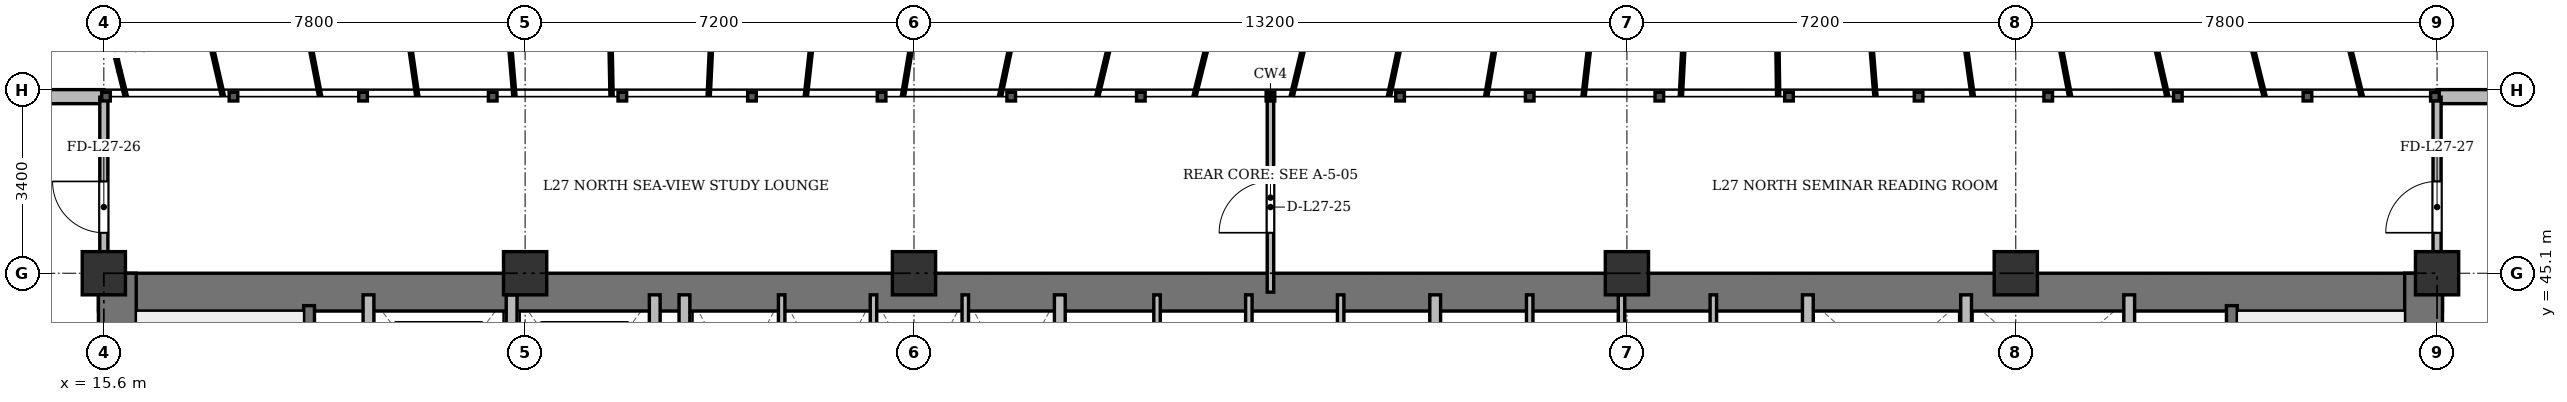
"""IFC4 building model, lengths in metres.
Left out: names, types, materials, properties, quantities, classifications, styles, units other than length and angle.
Written with IfcOpenShell. Run it as: python <this file> out.ifc"""

import sys

from ifc_helpers import new_model, si_unit, direction, frame, frame_2d, origin, origin_2d, place, context, subcontext, project, spatial, rectangle, extrude, source, transform, mapped, element, fill, save


model = new_model("IFC4")
c1 = context("Model", 3, precision=1e-05, world=origin(), true_north=direction((0.0, 1.0)))
c2 = subcontext(c1, "Body", "Model", "MODEL_VIEW")
j1 = project(units=[si_unit("LENGTHUNIT", "METRE"), si_unit("PLANEANGLEUNIT", "RADIAN")], contexts=[c1])
p1 = place(None, origin())
s1 = spatial("IfcSite", under=j1, at=p1, CompositionType="ELEMENT")
p2 = place(p1, origin())
s2 = spatial("IfcBuilding", under=s1, at=p2, CompositionType="ELEMENT")
p3 = place(p2, frame((0.0, 0.0, 106.9)))
s3 = spatial("IfcBuildingStorey", under=s2, at=p3, CompositionType="ELEMENT", Elevation=106.9)
m1 = source(origin(), c2, "Body", "SweptSolid", [
    extrude(rectangle(XDim=0.8, YDim=0.8, at=origin_2d()), origin(), (0.0, 0.0, 1.0), 3.6),
])
for number, where, z_axis, x_axis in (
    (1, (15.6, 45.1, 0.0), (0.0, 0.0, 1.0), (1.0, 0.0, 0.0)),
    (2, (23.4, 45.1, 0.0), (0.0, 0.0, 1.0), (1.0, 0.0, 0.0)),
    (3, (30.6, 45.1, 0.0), (0.0, 0.0, 1.0), (1.0, 0.0, 0.0)),
    (4, (43.8, 45.1, 0.0), (0.0, 0.0, 1.0), (1.0, 0.0, 0.0)),
    (5, (51.0, 45.1, 0.0), (0.0, 0.0, 1.0), (1.0, 0.0, 0.0)),
    (6, (58.8, 45.1, 0.0), (0.0, 0.0, 1.0), (1.0, 0.0, 0.0)),
):
    element("IfcColumn", number, at=place(p3, frame(where, z_axis=z_axis, x_axis=x_axis)), inside=s3, PredefinedType="COLUMN", context=c2, shape_type="MappedRepresentation", body=[
        mapped(m1, transform((0.0, 0.0, 0.0), x_axis=(1.0, 0.0, 0.0), y_axis=(0.0, 1.0, 0.0), z_axis=(0.0, 0.0, 1.0), scale=1.0)),
    ])
p4 = place(p3, frame((7.6, 48.37, 0.0), z_axis=(0.0, 0.0, 1.0), x_axis=(1.0, 0.0, 0.0)))
e7 = element("IfcWall", 7, at=p4, inside=s3, PredefinedType="SOLIDWALL", context=c2, shape_type="SweptSolid", body=[
    extrude(rectangle(XDim=8.0, YDim=0.26, at=frame_2d((4.0, 0.0))), origin(), (0.0, 0.0, 1.0), 3.34),
])
p5 = place(p4, frame((3.325, 0.0, 0.9)))
e8 = element("IfcOpeningElement", 8, at=p5, cuts=e7, PredefinedType="OPENING", context=c2, shape_type="SweptSolid", body=[
    extrude(rectangle(XDim=1.35, YDim=1.5, at=frame_2d((0.675, 0.75))), frame((0.0, 0.14, 0.0), z_axis=(0.0, -1.0, 0.0), x_axis=(1.0, 0.0, 0.0)), (0.0, 0.0, 1.0), 0.28),
])
p6 = place(p3, frame((58.8, 48.37, 0.0), z_axis=(0.0, 0.0, 1.0), x_axis=(1.0, 0.0, 0.0)))
e9 = element("IfcWall", 9, at=p6, inside=s3, PredefinedType="SOLIDWALL", context=c2, shape_type="SweptSolid", body=[
    extrude(rectangle(XDim=8.0, YDim=0.26, at=frame_2d((4.0, 0.0))), origin(), (0.0, 0.0, 1.0), 3.34),
])
p7 = place(p6, frame((3.325, 0.0, 0.9)))
e10 = element("IfcOpeningElement", 10, at=p7, cuts=e9, PredefinedType="OPENING", context=c2, shape_type="SweptSolid", body=[
    extrude(rectangle(XDim=1.35, YDim=1.5, at=frame_2d((0.675, 0.75))), frame((0.0, 0.14, 0.0), z_axis=(0.0, -1.0, 0.0), x_axis=(1.0, 0.0, 0.0)), (0.0, 0.0, 1.0), 0.28),
])
p8 = place(p3, frame((15.5, 44.75, 0.0), z_axis=(0.0, 0.0, 1.0), x_axis=(1.0, 0.0, 0.0)))
e11 = element("IfcWall", 11, at=p8, inside=s3, PredefinedType="SHEAR", context=c2, shape_type="SweptSolid", body=[
    extrude(rectangle(XDim=43.4, YDim=0.7, at=frame_2d((21.7, 0.0))), origin(), (0.0, 0.0, 1.0), 3.34),
])
for number, where, z_axis, x_axis in (
    (12, (15.85, 33.4, 0.0), (0.0, 0.0, 1.0), (0.0, 1.0, 0.0)),
    (13, (58.55, 33.4, 0.0), (0.0, 0.0, 1.0), (0.0, 1.0, 0.0)),
):
    element("IfcWall", number, at=place(p3, frame(where, z_axis=z_axis, x_axis=x_axis)), inside=s3, PredefinedType="SHEAR", context=c2, shape_type="SweptSolid", body=[
        extrude(rectangle(XDim=11.7, YDim=0.7, at=frame_2d((5.85, 0.0))), origin(), (0.0, 0.0, 1.0), 3.34),
    ])
p9 = place(p3, frame((19.4, 33.4, 0.0), z_axis=(0.0, 0.0, 1.0), x_axis=(0.0, 1.0, 0.0)))
e14 = element("IfcWall", 14, at=p9, inside=s3, PredefinedType="SHEAR", context=c2, shape_type="SweptSolid", body=[
    extrude(rectangle(XDim=11.1, YDim=0.2, at=frame_2d((5.55, 0.0))), origin(), (0.0, 0.0, 1.0), 3.34),
])
p10 = place(p9, frame((0.85, 0.0, 0.0)))
e15 = element("IfcOpeningElement", 15, at=p10, cuts=e14, PredefinedType="OPENING", context=c2, shape_type="SweptSolid", body=[
    extrude(rectangle(XDim=1.1, YDim=2.15, at=frame_2d((0.55, 1.075))), frame((0.0, 0.11, 0.0), z_axis=(0.0, -1.0, 0.0), x_axis=(1.0, 0.0, 0.0)), (0.0, 0.0, 1.0), 0.22),
])
p11 = place(p3, frame((55.0, 33.4, 0.0), z_axis=(0.0, 0.0, 1.0), x_axis=(0.0, 1.0, 0.0)))
e16 = element("IfcWall", 16, at=p11, inside=s3, PredefinedType="SHEAR", context=c2, shape_type="SweptSolid", body=[
    extrude(rectangle(XDim=11.1, YDim=0.2, at=frame_2d((5.55, 0.0))), origin(), (0.0, 0.0, 1.0), 3.34),
])
p12 = place(p11, frame((0.85, 0.0, 0.0)))
e17 = element("IfcOpeningElement", 17, at=p12, cuts=e16, PredefinedType="OPENING", context=c2, shape_type="SweptSolid", body=[
    extrude(rectangle(XDim=1.1, YDim=2.15, at=frame_2d((0.55, 1.075))), frame((0.0, 0.11, 0.0), z_axis=(0.0, -1.0, 0.0), x_axis=(1.0, 0.0, 0.0)), (0.0, 0.0, 1.0), 0.22),
])
for number, where, z_axis, x_axis in (
    (18, (20.5, 41.3, 0.0), (0.0, 0.0, 1.0), (0.0, 1.0, 0.0)),
    (19, (23.15, 41.3, 0.0), (0.0, 0.0, 1.0), (0.0, 1.0, 0.0)),
    (20, (25.8, 41.3, 0.0), (0.0, 0.0, 1.0), (0.0, 1.0, 0.0)),
):
    element("IfcWall", number, at=place(p3, frame(where, z_axis=z_axis, x_axis=x_axis)), inside=s3, PredefinedType="SOLIDWALL", context=c2, shape_type="SweptSolid", body=[
        extrude(rectangle(XDim=3.4, YDim=0.2, at=frame_2d((1.7, 0.0))), origin(), (0.0, 0.0, 1.0), 3.34),
    ])
p13 = place(p3, frame((26.35, 33.4, 0.0), z_axis=(0.0, 0.0, 1.0), x_axis=(0.0, 1.0, 0.0)))
e21 = element("IfcWall", 21, at=p13, inside=s3, PredefinedType="SOLIDWALL", context=c2, shape_type="SweptSolid", body=[
    extrude(rectangle(XDim=11.3, YDim=0.2, at=frame_2d((5.65, 0.0))), origin(), (0.0, 0.0, 1.0), 2.752),
])
p14 = place(p3, frame((33.3, 41.5, 0.0), z_axis=(0.0, 0.0, 1.0), x_axis=(0.0, 1.0, 0.0)))
e22 = element("IfcWall", 22, at=p14, inside=s3, PredefinedType="SOLIDWALL", context=c2, shape_type="SweptSolid", body=[
    extrude(rectangle(XDim=3.2, YDim=0.2, at=frame_2d((1.6, 0.0))), origin(), (0.0, 0.0, 1.0), 3.34),
])
for number, where, z_axis, x_axis in (
    (23, (28.15, 41.5, 0.0), (0.0, 0.0, 1.0), (0.0, 1.0, 0.0)),
    (24, (29.85, 41.5, 0.0), (0.0, 0.0, 1.0), (0.0, 1.0, 0.0)),
    (25, (31.55, 41.5, 0.0), (0.0, 0.0, 1.0), (0.0, 1.0, 0.0)),
    (26, (35.1, 41.5, 0.0), (0.0, 0.0, 1.0), (0.0, 1.0, 0.0)),
    (27, (36.8, 41.5, 0.0), (0.0, 0.0, 1.0), (0.0, 1.0, 0.0)),
    (28, (38.5, 41.5, 0.0), (0.0, 0.0, 1.0), (0.0, 1.0, 0.0)),
):
    element("IfcWall", number, at=place(p3, frame(where, z_axis=z_axis, x_axis=x_axis)), inside=s3, PredefinedType="PARTITIONING", context=c2, shape_type="SweptSolid", body=[
        extrude(rectangle(XDim=3.2, YDim=0.12, at=frame_2d((1.6, 0.0))), origin(), (0.0, 0.0, 1.0), 3.34),
    ])
p15 = place(p3, frame((40.25, 41.5, 0.0), z_axis=(0.0, 0.0, 1.0), x_axis=(0.0, 1.0, 0.0)))
e29 = element("IfcWall", 29, at=p15, inside=s3, PredefinedType="SOLIDWALL", context=c2, shape_type="SweptSolid", body=[
    extrude(rectangle(XDim=3.2, YDim=0.2, at=frame_2d((1.6, 0.0))), origin(), (0.0, 0.0, 1.0), 3.34),
])
p16 = place(p3, frame((42.0, 41.5, 0.0), z_axis=(0.0, 0.0, 1.0), x_axis=(0.0, 1.0, 0.0)))
e30 = element("IfcWall", 30, at=p16, inside=s3, PredefinedType="PARTITIONING", context=c2, shape_type="SweptSolid", body=[
    extrude(rectangle(XDim=3.2, YDim=0.12, at=frame_2d((1.6, 0.0))), origin(), (0.0, 0.0, 1.0), 3.34),
])
p17 = place(p3, frame((43.7, 41.5, 0.0), z_axis=(0.0, 0.0, 1.0), x_axis=(0.0, 1.0, 0.0)))
e31 = element("IfcWall", 31, at=p17, inside=s3, PredefinedType="PARTITIONING", context=c2, shape_type="SweptSolid", body=[
    extrude(rectangle(XDim=3.2, YDim=0.12, at=frame_2d((1.6, 0.0))), origin(), (0.0, 0.0, 1.0), 2.84),
])
p18 = place(p3, frame((45.4, 41.5, 0.0), z_axis=(0.0, 0.0, 1.0), x_axis=(0.0, 1.0, 0.0)))
e32 = element("IfcWall", 32, at=p18, inside=s3, PredefinedType="PARTITIONING", context=c2, shape_type="SweptSolid", body=[
    extrude(rectangle(XDim=3.2, YDim=0.12, at=frame_2d((1.6, 0.0))), origin(), (0.0, 0.0, 1.0), 3.34),
])
p19 = place(p3, frame((47.15, 33.4, 0.0), z_axis=(0.0, 0.0, 1.0), x_axis=(0.0, 1.0, 0.0)))
e33 = element("IfcWall", 33, at=p19, inside=s3, PredefinedType="SOLIDWALL", context=c2, shape_type="SweptSolid", body=[
    extrude(rectangle(XDim=11.3, YDim=0.2, at=frame_2d((5.65, 0.0))), origin(), (0.0, 0.0, 1.0), 2.752),
])
for number, where, z_axis, x_axis in (
    (34, (50.08, 42.05, 0.0), (0.0, 0.0, 1.0), (0.0, 1.0, 0.0)),
    (35, (53.1, 42.05, 0.0), (0.0, 0.0, 1.0), (0.0, 1.0, 0.0)),
):
    element("IfcWall", number, at=place(p3, frame(where, z_axis=z_axis, x_axis=x_axis)), inside=s3, PredefinedType="SOLIDWALL", context=c2, shape_type="SweptSolid", body=[
        extrude(rectangle(XDim=2.65, YDim=0.2, at=frame_2d((1.325, 0.0))), origin(), (0.0, 0.0, 1.0), 3.34),
    ])
p20 = place(p3, frame((37.2, 44.75, 0.0), z_axis=(0.0, 0.0, 1.0), x_axis=(0.0, 1.0, 0.0)))
e36 = element("IfcWall", 36, at=p20, inside=s3, PredefinedType="PARTITIONING", context=c2, shape_type="SweptSolid", body=[
    extrude(rectangle(XDim=3.61, YDim=0.12, at=frame_2d((1.805, 0.0))), origin(), (0.0, 0.0, 1.0), 2.752),
])
p21 = place(p20, frame((1.1, 0.0, 0.0)))
e37 = element("IfcOpeningElement", 37, at=p21, cuts=e36, PredefinedType="OPENING", context=c2, shape_type="SweptSolid", body=[
    extrude(rectangle(XDim=0.95, YDim=2.15, at=frame_2d((0.475, 1.075))), frame((0.0, 0.07, 0.0), z_axis=(0.0, -1.0, 0.0), x_axis=(1.0, 0.0, 0.0)), (0.0, 0.0, 1.0), 0.14),
])
p22 = place(p3, frame((15.6, 44.75, 0.0), z_axis=(0.0, 0.0, 1.0), x_axis=(0.0, 1.0, 0.0)))
e38 = element("IfcWall", 38, at=p22, inside=s3, PredefinedType="PARTITIONING", context=c2, shape_type="SweptSolid", body=[
    extrude(rectangle(XDim=3.61, YDim=0.15, at=frame_2d((1.805, 0.0))), origin(), (0.0, 0.0, 1.0), 2.84),
])
p23 = place(p22, frame((1.1, 0.0, 0.0)))
e39 = element("IfcOpeningElement", 39, at=p23, cuts=e38, PredefinedType="OPENING", context=c2, shape_type="SweptSolid", body=[
    extrude(rectangle(XDim=0.95, YDim=2.15, at=frame_2d((0.475, 1.075))), frame((0.0, 0.085, 0.0), z_axis=(0.0, -1.0, 0.0), x_axis=(1.0, 0.0, 0.0)), (0.0, 0.0, 1.0), 0.17),
])
p24 = place(p3, frame((58.8, 44.75, 0.0), z_axis=(0.0, 0.0, 1.0), x_axis=(0.0, 1.0, 0.0)))
e40 = element("IfcWall", 40, at=p24, inside=s3, PredefinedType="PARTITIONING", context=c2, shape_type="SweptSolid", body=[
    extrude(rectangle(XDim=3.61, YDim=0.15, at=frame_2d((1.805, 0.0))), origin(), (0.0, 0.0, 1.0), 2.84),
])
p25 = place(p24, frame((1.1, 0.0, 0.0)))
e41 = element("IfcOpeningElement", 41, at=p25, cuts=e40, PredefinedType="OPENING", context=c2, shape_type="SweptSolid", body=[
    extrude(rectangle(XDim=0.95, YDim=2.15, at=frame_2d((0.475, 1.075))), frame((0.0, 0.085, 0.0), z_axis=(0.0, -1.0, 0.0), x_axis=(1.0, 0.0, 0.0)), (0.0, 0.0, 1.0), 0.17),
])
m2 = source(origin(), c2, "Body", "SweptSolid", [
    extrude(rectangle(XDim=0.95, YDim=2.15, at=frame_2d((0.475, 1.075))), frame((0.0, 0.025, 0.0), z_axis=(0.0, -1.0, 0.0), x_axis=(1.0, 0.0, 0.0)), (0.0, 0.0, 1.0), 0.05),
])
p26 = place(p21, origin())
e42 = element("IfcDoor", 42, at=p26, inside=s3, OperationType="SINGLE_SWING_LEFT", PredefinedType="DOOR", context=c2, shape_type="MappedRepresentation", body=[
    mapped(m2, transform((0.0, 0.0, 0.0), x_axis=(1.0, 0.0, 0.0), y_axis=(0.0, 1.0, 0.0), z_axis=(0.0, 0.0, 1.0), scale=1.0)),
])
fill(e37, e42)
p27 = place(p23, origin())
e43 = element("IfcDoor", 43, at=p27, inside=s3, OperationType="SINGLE_SWING_RIGHT", PredefinedType="DOOR", context=c2, shape_type="MappedRepresentation", body=[
    mapped(m2, transform((0.0, 0.0, 0.0), x_axis=(1.0, 0.0, 0.0), y_axis=(0.0, 1.0, 0.0), z_axis=(0.0, 0.0, 1.0), scale=1.0)),
])
fill(e39, e43)
p28 = place(p25, origin())
e44 = element("IfcDoor", 44, at=p28, inside=s3, OperationType="SINGLE_SWING_LEFT", PredefinedType="DOOR", context=c2, shape_type="MappedRepresentation", body=[
    mapped(m2, transform((0.0, 0.0, 0.0), x_axis=(1.0, 0.0, 0.0), y_axis=(0.0, 1.0, 0.0), z_axis=(0.0, 0.0, 1.0), scale=1.0)),
])
fill(e41, e44)
save(model, sys.argv[1])
